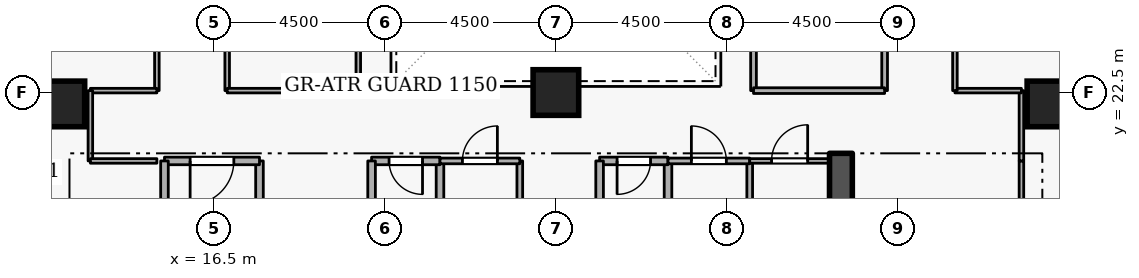
"""IFC4 building model, lengths in metres.
Left out: names, types, materials, properties, quantities, classifications, styles, units other than length and angle.
Written with IfcOpenShell. Run it as: python <this file> out.ifc"""

import sys

from ifc_helpers import new_model, si_unit, direction, frame, frame_2d, origin, origin_2d, place, context, subcontext, project, spatial, rectangle, extrude, element, fill, save


model = new_model("IFC4")
c1 = context("Model", 3, precision=1e-05, world=origin(), true_north=direction((0.0, 1.0)))
c2 = subcontext(c1, "Body", "Model", "MODEL_VIEW")
j1 = project(units=[si_unit("LENGTHUNIT", "METRE"), si_unit("PLANEANGLEUNIT", "RADIAN")], contexts=[c1])
p1 = place(None, origin())
s1 = spatial("IfcSite", under=j1, at=p1, CompositionType="ELEMENT")
p2 = place(p1, origin())
s2 = spatial("IfcBuilding", under=s1, at=p2, CompositionType="ELEMENT")
p3 = place(p2, frame((0.0, 0.0, 112.5)))
s3 = spatial("IfcBuildingStorey", under=s2, at=p3, CompositionType="ELEMENT", Elevation=112.5)
p4 = place(p3, frame((33.0, 15.2, 0.0), z_axis=(0.0, 0.0, 1.0), x_axis=(0.0, 1.0, 0.0)))
e1 = element("IfcWall", 1, at=p4, inside=s3, PredefinedType="SHEAR", context=c2, shape_type="SweptSolid", body=[
    extrude(rectangle(XDim=5.7, YDim=0.6, at=frame_2d((2.85, 0.0))), origin(), (0.0, 0.0, 1.0), 3.6),
])
for number, where, z_axis, x_axis in (
    (2, (12.5, 22.2, 0.0), (0.0, 0.0, 1.0), (1.0, 0.0, 0.0)),
    (3, (38.5, 22.2, 0.0), (0.0, 0.0, 1.0), (1.0, 0.0, 0.0)),
    (4, (25.5, 22.5, 0.0), (0.0, 0.0, 1.0), (1.0, 0.0, 0.0)),
):
    element("IfcColumn", number, at=place(p3, frame(where, z_axis=z_axis, x_axis=x_axis)), inside=s3, PredefinedType="COLUMN", context=c2, shape_type="SweptSolid", body=[
        extrude(rectangle(XDim=1.2, YDim=1.2, at=origin_2d()), origin(), (0.0, 0.0, 1.0), 3.6),
    ])
p5 = place(p3, frame((17.7, 18.4, 0.0), z_axis=(0.0, 0.0, 1.0), x_axis=(0.0, 1.0, 0.0)))
e5 = element("IfcWall", 5, at=p5, inside=s3, PredefinedType="STANDARD", context=c2, shape_type="SweptSolid", body=[
    extrude(rectangle(XDim=2.3, YDim=0.2, at=frame_2d((1.15, 0.0))), origin(), (0.0, 0.0, 1.0), 2.545),
])
p6 = place(p3, frame((17.7, 20.7, 0.0), z_axis=(0.0, 0.0, 1.0), x_axis=(-1.0, 0.0, 0.0)))
e6 = element("IfcWall", 6, at=p6, inside=s3, PredefinedType="STANDARD", context=c2, shape_type="SweptSolid", body=[
    extrude(rectangle(XDim=2.5, YDim=0.2, at=frame_2d((1.25, 0.0))), origin(), (0.0, 0.0, 1.0), 3.34),
])
p7 = place(p6, frame((0.675, 0.0, 0.0)))
e7 = element("IfcOpeningElement", 7, at=p7, cuts=e6, PredefinedType="OPENING", context=c2, shape_type="SweptSolid", body=[
    extrude(rectangle(XDim=1.15, YDim=2.1, at=frame_2d((0.575, 1.05))), frame((0.0, 0.11, 0.0), z_axis=(0.0, -1.0, 0.0), x_axis=(1.0, 0.0, 0.0)), (0.0, 0.0, 1.0), 0.22),
])
p8 = place(p3, frame((15.2, 20.7, 0.0), z_axis=(0.0, 0.0, 1.0), x_axis=(0.0, -1.0, 0.0)))
e8 = element("IfcWall", 8, at=p8, inside=s3, PredefinedType="STANDARD", context=c2, shape_type="SweptSolid", body=[
    extrude(rectangle(XDim=5.7, YDim=0.2, at=frame_2d((2.85, 0.0))), origin(), (0.0, 0.0, 1.0), 3.34),
])
p9 = place(p3, frame((28.45, 18.65, 0.0), z_axis=(0.0, 0.0, 1.0), x_axis=(0.0, 1.0, 0.0)))
e9 = element("IfcWall", 9, at=p9, inside=s3, PredefinedType="STANDARD", context=c2, shape_type="SweptSolid", body=[
    extrude(rectangle(XDim=2.05, YDim=0.2, at=frame_2d((1.025, 0.0))), origin(), (0.0, 0.0, 1.0), 3.34),
])
p10 = place(p3, frame((28.45, 20.7, 0.0), z_axis=(0.0, 0.0, 1.0), x_axis=(-1.0, 0.0, 0.0)))
e10 = element("IfcWall", 10, at=p10, inside=s3, PredefinedType="STANDARD", context=c2, shape_type="SweptSolid", body=[
    extrude(rectangle(XDim=1.8, YDim=0.2, at=frame_2d((0.9, 0.0))), origin(), (0.0, 0.0, 1.0), 3.34),
])
p11 = place(p10, frame((0.46, 0.0, 0.0)))
e11 = element("IfcOpeningElement", 11, at=p11, cuts=e10, PredefinedType="OPENING", context=c2, shape_type="SweptSolid", body=[
    extrude(rectangle(XDim=0.88, YDim=2.04, at=frame_2d((0.44, 1.02))), frame((0.0, 0.11, 0.0), z_axis=(0.0, -1.0, 0.0), x_axis=(1.0, 0.0, 0.0)), (0.0, 0.0, 1.0), 0.22),
])
for number, where, z_axis, x_axis in (
    (12, (26.65, 20.7, 0.0), (0.0, 0.0, 1.0), (0.0, -1.0, 0.0)),
    (13, (22.45, 18.65, 0.0), (0.0, 0.0, 1.0), (0.0, 1.0, 0.0)),
):
    element("IfcWall", number, at=place(p3, frame(where, z_axis=z_axis, x_axis=x_axis)), inside=s3, PredefinedType="STANDARD", context=c2, shape_type="SweptSolid", body=[
        extrude(rectangle(XDim=2.05, YDim=0.2, at=frame_2d((1.025, 0.0))), origin(), (0.0, 0.0, 1.0), 3.34),
    ])
p12 = place(p3, frame((22.45, 20.7, 0.0), z_axis=(0.0, 0.0, 1.0), x_axis=(-1.0, 0.0, 0.0)))
e14 = element("IfcWall", 14, at=p12, inside=s3, PredefinedType="STANDARD", context=c2, shape_type="SweptSolid", body=[
    extrude(rectangle(XDim=1.8, YDim=0.2, at=frame_2d((0.9, 0.0))), origin(), (0.0, 0.0, 1.0), 3.34),
])
p13 = place(p12, frame((0.46, 0.0, 0.0)))
e15 = element("IfcOpeningElement", 15, at=p13, cuts=e14, PredefinedType="OPENING", context=c2, shape_type="SweptSolid", body=[
    extrude(rectangle(XDim=0.88, YDim=2.04, at=frame_2d((0.44, 1.02))), frame((0.0, 0.11, 0.0), z_axis=(0.0, -1.0, 0.0), x_axis=(1.0, 0.0, 0.0)), (0.0, 0.0, 1.0), 0.22),
])
p14 = place(p3, frame((20.65, 20.7, 0.0), z_axis=(0.0, 0.0, 1.0), x_axis=(0.0, -1.0, 0.0)))
e16 = element("IfcWall", 16, at=p14, inside=s3, PredefinedType="STANDARD", context=c2, shape_type="SweptSolid", body=[
    extrude(rectangle(XDim=2.05, YDim=0.2, at=frame_2d((1.025, 0.0))), origin(), (0.0, 0.0, 1.0), 3.34),
])
p15 = place(p3, frame((24.55, 20.7, 0.0), z_axis=(0.0, 0.0, 1.0), x_axis=(0.0, -1.0, 0.0)))
e17 = element("IfcWall", 17, at=p15, inside=s3, PredefinedType="PARTITIONING", context=c2, shape_type="SweptSolid", body=[
    extrude(rectangle(XDim=2.05, YDim=0.15, at=frame_2d((1.025, 0.0))), origin(), (0.0, 0.0, 1.0), 3.34),
])
p16 = place(p3, frame((22.45, 20.7, 0.0), z_axis=(0.0, 0.0, 1.0), x_axis=(1.0, 0.0, 0.0)))
e18 = element("IfcWall", 18, at=p16, inside=s3, PredefinedType="PARTITIONING", context=c2, shape_type="SweptSolid", body=[
    extrude(rectangle(XDim=2.1, YDim=0.15, at=frame_2d((1.05, 0.0))), origin(), (0.0, 0.0, 1.0), 3.34),
])
p17 = place(p16, frame((0.59, 0.0, 0.0)))
e19 = element("IfcOpeningElement", 19, at=p17, cuts=e18, PredefinedType="OPENING", context=c2, shape_type="SweptSolid", body=[
    extrude(rectangle(XDim=0.92, YDim=2.08, at=frame_2d((0.46, 1.04))), frame((0.0, 0.085, 0.0), z_axis=(0.0, -1.0, 0.0), x_axis=(1.0, 0.0, 0.0)), (0.0, 0.0, 1.0), 0.17),
])
p18 = place(p3, frame((30.6, 20.7, 0.0), z_axis=(0.0, 0.0, 1.0), x_axis=(0.0, -1.0, 0.0)))
e20 = element("IfcWall", 20, at=p18, inside=s3, PredefinedType="PARTITIONING", context=c2, shape_type="SweptSolid", body=[
    extrude(rectangle(XDim=2.05, YDim=0.15, at=frame_2d((1.025, 0.0))), origin(), (0.0, 0.0, 1.0), 3.34),
])
p19 = place(p3, frame((28.45, 20.7, 0.0), z_axis=(0.0, 0.0, 1.0), x_axis=(1.0, 0.0, 0.0)))
e21 = element("IfcWall", 21, at=p19, inside=s3, PredefinedType="PARTITIONING", context=c2, shape_type="SweptSolid", body=[
    extrude(rectangle(XDim=2.15, YDim=0.15, at=frame_2d((1.075, 0.0))), origin(), (0.0, 0.0, 1.0), 3.34),
])
p20 = place(p19, frame((0.615, 0.0, 0.0)))
e22 = element("IfcOpeningElement", 22, at=p20, cuts=e21, PredefinedType="OPENING", context=c2, shape_type="SweptSolid", body=[
    extrude(rectangle(XDim=0.92, YDim=2.08, at=frame_2d((0.46, 1.04))), frame((0.0, 0.085, 0.0), z_axis=(0.0, -1.0, 0.0), x_axis=(1.0, 0.0, 0.0)), (0.0, 0.0, 1.0), 0.17),
])
p21 = place(p3, frame((30.6, 20.7, 0.0), z_axis=(0.0, 0.0, 1.0), x_axis=(1.0, 0.0, 0.0)))
e23 = element("IfcWall", 23, at=p21, inside=s3, PredefinedType="PARTITIONING", context=c2, shape_type="SweptSolid", body=[
    extrude(rectangle(XDim=2.1, YDim=0.12, at=frame_2d((1.05, 0.0))), origin(), (0.0, 0.0, 1.0), 3.34),
])
p22 = place(p21, frame((0.575, 0.0, 0.0)))
e24 = element("IfcOpeningElement", 24, at=p22, cuts=e23, PredefinedType="OPENING", context=c2, shape_type="SweptSolid", body=[
    extrude(rectangle(XDim=0.95, YDim=2.1, at=frame_2d((0.475, 1.05))), frame((0.0, 0.07, 0.0), z_axis=(0.0, -1.0, 0.0), x_axis=(1.0, 0.0, 0.0)), (0.0, 0.0, 1.0), 0.14),
])
p23 = place(p3, frame((15.0, 27.0, 0.0), z_axis=(0.0, 0.0, 1.0), x_axis=(0.0, -1.0, 0.0)))
e25 = element("IfcWall", 25, at=p23, inside=s3, PredefinedType="PARTITIONING", context=c2, shape_type="SweptSolid", body=[
    extrude(rectangle(XDim=4.45, YDim=0.12, at=frame_2d((2.225, 0.0))), origin(), (0.0, 0.0, 1.0), 3.34),
])
p24 = place(p23, frame((1.7, 0.0, 0.0)))
e26 = element("IfcOpeningElement", 26, at=p24, cuts=e25, PredefinedType="OPENING", context=c2, shape_type="SweptSolid", body=[
    extrude(rectangle(XDim=1.05, YDim=2.1, at=frame_2d((0.525, 1.05))), frame((0.0, 0.07, 0.0), z_axis=(0.0, -1.0, 0.0), x_axis=(1.0, 0.0, 0.0)), (0.0, 0.0, 1.0), 0.14),
])
p25 = place(p3, frame((15.0, 22.55, 0.0), z_axis=(0.0, 0.0, 1.0), x_axis=(-1.0, 0.0, 0.0)))
e27 = element("IfcWall", 27, at=p25, inside=s3, PredefinedType="PARTITIONING", context=c2, shape_type="SweptSolid", body=[
    extrude(rectangle(XDim=1.75, YDim=0.12, at=frame_2d((0.875, 0.0))), origin(), (0.0, 0.0, 1.0), 3.34),
])
p26 = place(p3, frame((13.25, 22.55, 0.0), z_axis=(0.0, 0.0, 1.0), x_axis=(0.0, -1.0, 0.0)))
e28 = element("IfcWall", 28, at=p26, inside=s3, PredefinedType="PARTITIONING", context=c2, shape_type="SweptSolid", body=[
    extrude(rectangle(XDim=1.85, YDim=0.12, at=frame_2d((0.925, 0.0))), origin(), (0.0, 0.0, 1.0), 3.34),
])
p27 = place(p3, frame((13.25, 20.7, 0.0), z_axis=(0.0, 0.0, 1.0), x_axis=(1.0, 0.0, 0.0)))
e29 = element("IfcWall", 29, at=p27, inside=s3, PredefinedType="PARTITIONING", context=c2, shape_type="SweptSolid", body=[
    extrude(rectangle(XDim=1.75, YDim=0.12, at=frame_2d((0.875, 0.0))), origin(), (0.0, 0.0, 1.0), 3.34),
])
p28 = place(p3, frame((37.75, 17.55, 0.0), z_axis=(0.0, 0.0, 1.0), x_axis=(0.0, 1.0, 0.0)))
e30 = element("IfcWall", 30, at=p28, inside=s3, PredefinedType="PARTITIONING", context=c2, shape_type="SweptSolid", body=[
    extrude(rectangle(XDim=3.15, YDim=0.12, at=frame_2d((1.575, 0.0))), origin(), (0.0, 0.0, 1.0), 3.34),
])
p29 = place(p3, frame((37.75, 20.7, 0.0), z_axis=(0.0, 0.0, 1.0), x_axis=(0.0, 1.0, 0.0)))
e31 = element("IfcWall", 31, at=p29, inside=s3, PredefinedType="PARTITIONING", context=c2, shape_type="SweptSolid", body=[
    extrude(rectangle(XDim=1.85, YDim=0.12, at=frame_2d((0.925, 0.0))), origin(), (0.0, 0.0, 1.0), 3.34),
])
p30 = place(p3, frame((37.75, 22.55, 0.0), z_axis=(0.0, 0.0, 1.0), x_axis=(-1.0, 0.0, 0.0)))
e32 = element("IfcWall", 32, at=p30, inside=s3, PredefinedType="PARTITIONING", context=c2, shape_type="SweptSolid", body=[
    extrude(rectangle(XDim=1.75, YDim=0.12, at=frame_2d((0.875, 0.0))), origin(), (0.0, 0.0, 1.0), 3.34),
])
p31 = place(p3, frame((36.0, 22.55, 0.0), z_axis=(0.0, 0.0, 1.0), x_axis=(0.0, 1.0, 0.0)))
e33 = element("IfcWall", 33, at=p31, inside=s3, PredefinedType="PARTITIONING", context=c2, shape_type="SweptSolid", body=[
    extrude(rectangle(XDim=4.45, YDim=0.12, at=frame_2d((2.225, 0.0))), origin(), (0.0, 0.0, 1.0), 3.34),
])
p32 = place(p31, frame((1.7, 0.0, 0.0)))
e34 = element("IfcOpeningElement", 34, at=p32, cuts=e33, PredefinedType="OPENING", context=c2, shape_type="SweptSolid", body=[
    extrude(rectangle(XDim=1.05, YDim=2.1, at=frame_2d((0.525, 1.05))), frame((0.0, 0.07, 0.0), z_axis=(0.0, -1.0, 0.0), x_axis=(1.0, 0.0, 0.0)), (0.0, 0.0, 1.0), 0.14),
])
p33 = place(p3, frame((30.7, 22.55, 0.0), z_axis=(0.0, 0.0, 1.0), x_axis=(0.0, 1.0, 0.0)))
e35 = element("IfcWall", 35, at=p33, inside=s3, PredefinedType="PARTITIONING", context=c2, shape_type="SweptSolid", body=[
    extrude(rectangle(XDim=8.9, YDim=0.15, at=frame_2d((4.45, 0.0))), origin(), (0.0, 0.0, 1.0), 3.34),
])
p34 = place(p3, frame((34.15, 31.45, 0.0), z_axis=(0.0, 0.0, 1.0), x_axis=(0.0, -1.0, 0.0)))
e36 = element("IfcWall", 36, at=p34, inside=s3, PredefinedType="PARTITIONING", context=c2, shape_type="SweptSolid", body=[
    extrude(rectangle(XDim=8.9, YDim=0.15, at=frame_2d((4.45, 0.0))), origin(), (0.0, 0.0, 1.0), 3.34),
])
p35 = place(p34, frame((3.8, 0.0, 0.0)))
e37 = element("IfcOpeningElement", 37, at=p35, cuts=e36, PredefinedType="OPENING", context=c2, shape_type="SweptSolid", body=[
    extrude(rectangle(XDim=1.3, YDim=2.12, at=frame_2d((0.65, 1.06))), frame((0.0, 0.085, 0.0), z_axis=(0.0, -1.0, 0.0), x_axis=(1.0, 0.0, 0.0)), (0.0, 0.0, 1.0), 0.17),
])
p36 = place(p3, frame((34.15, 22.55, 0.0), z_axis=(0.0, 0.0, 1.0), x_axis=(-1.0, 0.0, 0.0)))
e38 = element("IfcWall", 38, at=p36, inside=s3, PredefinedType="PARTITIONING", context=c2, shape_type="SweptSolid", body=[
    extrude(rectangle(XDim=3.45, YDim=0.15, at=frame_2d((1.725, 0.0))), origin(), (0.0, 0.0, 1.0), 3.34),
])
p37 = place(p3, frame((16.85, 22.55, 0.0), z_axis=(0.0, 0.0, 1.0), x_axis=(0.0, 1.0, 0.0)))
e39 = element("IfcWall", 39, at=p37, inside=s3, PredefinedType="PARTITIONING", context=c2, shape_type="SweptSolid", body=[
    extrude(rectangle(XDim=8.9, YDim=0.12, at=frame_2d((4.45, 0.0))), origin(), (0.0, 0.0, 1.0), 3.34),
])
p38 = place(p37, frame((3.975, 0.0, 0.0)))
e40 = element("IfcOpeningElement", 40, at=p38, cuts=e39, PredefinedType="OPENING", context=c2, shape_type="SweptSolid", body=[
    extrude(rectangle(XDim=0.95, YDim=2.1, at=frame_2d((0.475, 1.05))), frame((0.0, 0.07, 0.0), z_axis=(0.0, -1.0, 0.0), x_axis=(1.0, 0.0, 0.0)), (0.0, 0.0, 1.0), 0.14),
])
p39 = place(p3, frame((20.3, 31.45, 0.0), z_axis=(0.0, 0.0, 1.0), x_axis=(0.0, -1.0, 0.0)))
e41 = element("IfcWall", 41, at=p39, inside=s3, PredefinedType="PARTITIONING", context=c2, shape_type="SweptSolid", body=[
    extrude(rectangle(XDim=8.9, YDim=0.12, at=frame_2d((4.45, 0.0))), origin(), (0.0, 0.0, 1.0), 3.34),
])
p40 = place(p3, frame((20.3, 22.55, 0.0), z_axis=(0.0, 0.0, 1.0), x_axis=(-1.0, 0.0, 0.0)))
e42 = element("IfcWall", 42, at=p40, inside=s3, PredefinedType="PARTITIONING", context=c2, shape_type="SweptSolid", body=[
    extrude(rectangle(XDim=3.45, YDim=0.12, at=frame_2d((1.725, 0.0))), origin(), (0.0, 0.0, 1.0), 3.34),
])
p41 = place(p7, origin())
e43 = element("IfcDoor", 43, at=p41, inside=s3, OperationType="SINGLE_SWING_RIGHT", PredefinedType="DOOR", context=c2, shape_type="SweptSolid", body=[
    extrude(rectangle(XDim=1.15, YDim=2.1, at=frame_2d((0.575, 1.05))), frame((0.0, 0.025, 0.0), z_axis=(0.0, -1.0, 0.0), x_axis=(1.0, 0.0, 0.0)), (0.0, 0.0, 1.0), 0.05),
])
fill(e7, e43)
p42 = place(p11, origin())
e44 = element("IfcDoor", 44, at=p42, inside=s3, OperationType="SINGLE_SWING_RIGHT", PredefinedType="DOOR", context=c2, shape_type="SweptSolid", body=[
    extrude(rectangle(XDim=0.88, YDim=2.04, at=frame_2d((0.44, 1.02))), frame((0.0, 0.025, 0.0), z_axis=(0.0, -1.0, 0.0), x_axis=(1.0, 0.0, 0.0)), (0.0, 0.0, 1.0), 0.05),
])
fill(e11, e44)
p43 = place(p13, origin())
e45 = element("IfcDoor", 45, at=p43, inside=s3, OperationType="SINGLE_SWING_LEFT", PredefinedType="DOOR", context=c2, shape_type="SweptSolid", body=[
    extrude(rectangle(XDim=0.88, YDim=2.04, at=frame_2d((0.44, 1.02))), frame((0.0, 0.025, 0.0), z_axis=(0.0, -1.0, 0.0), x_axis=(1.0, 0.0, 0.0)), (0.0, 0.0, 1.0), 0.05),
])
fill(e15, e45)
p44 = place(p17, origin())
e46 = element("IfcDoor", 46, at=p44, inside=s3, OperationType="SINGLE_SWING_RIGHT", PredefinedType="DOOR", context=c2, shape_type="SweptSolid", body=[
    extrude(rectangle(XDim=0.92, YDim=2.08, at=frame_2d((0.46, 1.04))), frame((0.0, 0.025, 0.0), z_axis=(0.0, -1.0, 0.0), x_axis=(1.0, 0.0, 0.0)), (0.0, 0.0, 1.0), 0.05),
])
fill(e19, e46)
p45 = place(p20, origin())
e47 = element("IfcDoor", 47, at=p45, inside=s3, OperationType="SINGLE_SWING_LEFT", PredefinedType="DOOR", context=c2, shape_type="SweptSolid", body=[
    extrude(rectangle(XDim=0.92, YDim=2.08, at=frame_2d((0.46, 1.04))), frame((0.0, 0.025, 0.0), z_axis=(0.0, -1.0, 0.0), x_axis=(1.0, 0.0, 0.0)), (0.0, 0.0, 1.0), 0.05),
])
fill(e22, e47)
p46 = place(p22, origin())
e48 = element("IfcDoor", 48, at=p46, inside=s3, OperationType="SINGLE_SWING_RIGHT", PredefinedType="DOOR", context=c2, shape_type="SweptSolid", body=[
    extrude(rectangle(XDim=0.95, YDim=2.1, at=frame_2d((0.475, 1.05))), frame((0.0, 0.025, 0.0), z_axis=(0.0, -1.0, 0.0), x_axis=(1.0, 0.0, 0.0)), (0.0, 0.0, 1.0), 0.05),
])
fill(e24, e48)
save(model, sys.argv[1])
